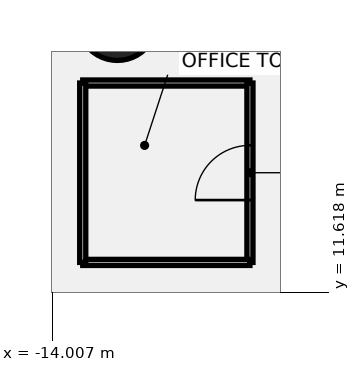
"""IFC4 building model, lengths in metres.
Left out: names, types, materials, properties, quantities, classifications, styles, units other than length and angle.
Written with IfcOpenShell. Run it as: python <this file> out.ifc"""

import sys

from ifc_helpers import new_model, si_unit, direction, frame, frame_2d, origin, origin_2d, place, context, subcontext, project, spatial, rectangle, circle, extrude, element, fill, save


model = new_model("IFC4")
c1 = context("Model", 3, precision=1e-05, world=origin(), true_north=direction((0.0, 1.0)))
c2 = subcontext(c1, "Body", "Model", "MODEL_VIEW")
j1 = project(units=[si_unit("LENGTHUNIT", "METRE"), si_unit("PLANEANGLEUNIT", "RADIAN")], contexts=[c1])
p1 = place(None, origin())
s1 = spatial("IfcSite", under=j1, at=p1, CompositionType="ELEMENT")
p2 = place(p1, origin())
s2 = spatial("IfcBuilding", under=s1, at=p2, CompositionType="ELEMENT")
p3 = place(p2, origin())
s3 = spatial("IfcBuildingStorey", under=s2, at=p3, CompositionType="ELEMENT", Elevation=0.0)
p4 = place(p3, frame((-11.86, 20.543, -0.55), z_axis=(0.0, 0.0, 1.0), x_axis=(1.0, 0.0, 0.0)))
e1 = element("IfcColumn", 1, at=p4, inside=s3, PredefinedType="COLUMN", context=c2, shape_type="SweptSolid", body=[
    extrude(circle(Radius=1.3, at=origin_2d()), origin(), (0.0, 0.0, 1.0), 9.05),
])
p5 = place(p3, frame((-13.0, 18.5, 0.0), z_axis=(0.0, 0.0, 1.0), x_axis=(1.0, 0.0, 0.0)))
e2 = element("IfcWall", 2, at=p5, inside=s3, PredefinedType="PARTITIONING", context=c2, shape_type="SweptSolid", body=[
    extrude(rectangle(XDim=5.5, YDim=0.2, at=frame_2d((2.75, 0.0))), origin(), (0.0, 0.0, 1.0), 8.5),
])
p6 = place(p3, frame((-7.5, 12.6, 0.0), z_axis=(0.0, 0.0, 1.0), x_axis=(0.0, 1.0, 0.0)))
e3 = element("IfcWall", 3, at=p6, inside=s3, PredefinedType="PARTITIONING", context=c2, shape_type="SweptSolid", body=[
    extrude(rectangle(XDim=5.9, YDim=0.2, at=frame_2d((2.95, 0.0))), origin(), (0.0, 0.0, 1.0), 8.5),
])
p7 = place(p6, frame((2.05, 0.0, 0.0)))
e4 = element("IfcOpeningElement", 4, at=p7, cuts=e3, PredefinedType="OPENING", context=c2, shape_type="SweptSolid", body=[
    extrude(rectangle(XDim=1.8, YDim=2.1, at=frame_2d((0.9, 1.05))), frame((0.0, 0.11, 0.0), z_axis=(0.0, -1.0, 0.0), x_axis=(1.0, 0.0, 0.0)), (0.0, 0.0, 1.0), 0.22),
])
p8 = place(p3, frame((-13.0, 12.6, 0.0), z_axis=(0.0, 0.0, 1.0), x_axis=(1.0, 0.0, 0.0)))
e5 = element("IfcWall", 5, at=p8, inside=s3, PredefinedType="PARTITIONING", context=c2, shape_type="SweptSolid", body=[
    extrude(rectangle(XDim=5.5, YDim=0.2, at=frame_2d((2.75, 0.0))), origin(), (0.0, 0.0, 1.0), 8.5),
])
p9 = place(p3, frame((-13.0, 12.6, 0.0), z_axis=(0.0, 0.0, 1.0), x_axis=(0.0, 1.0, 0.0)))
e6 = element("IfcWall", 6, at=p9, inside=s3, PredefinedType="PARTITIONING", context=c2, shape_type="SweptSolid", body=[
    extrude(rectangle(XDim=5.9, YDim=0.2, at=frame_2d((2.95, 0.0))), origin(), (0.0, 0.0, 1.0), 8.5),
])
p10 = place(p7, origin())
e7 = element("IfcDoor", 7, at=p10, inside=s3, OperationType="SINGLE_SWING_LEFT", PredefinedType="DOOR", context=c2, shape_type="SweptSolid", body=[
    extrude(rectangle(XDim=1.8, YDim=2.1, at=frame_2d((0.9, 1.05))), frame((0.0, 0.025, 0.0), z_axis=(0.0, -1.0, 0.0), x_axis=(1.0, 0.0, 0.0)), (0.0, 0.0, 1.0), 0.05),
])
fill(e4, e7)
save(model, sys.argv[1])
